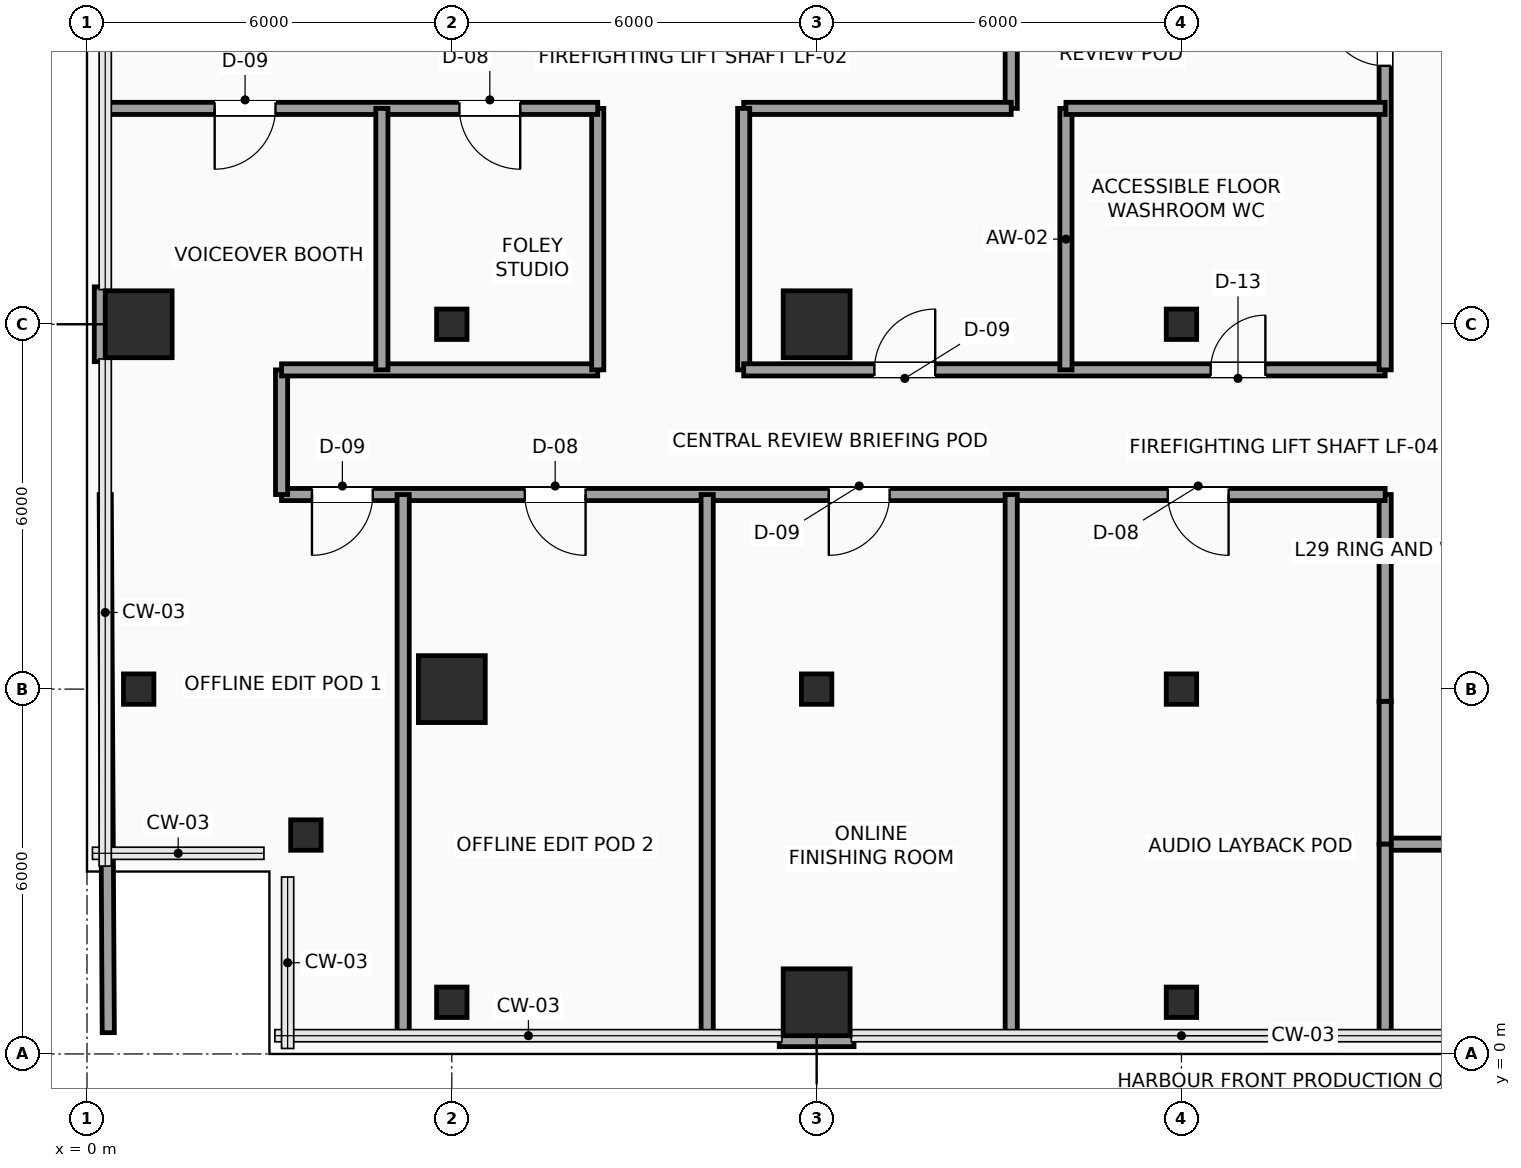
"""IFC4 building model, lengths in metres.
Left out: names, types, materials, properties, quantities, classifications, styles, units other than length and angle.
Written with IfcOpenShell. Run it as: python <this file> out.ifc"""

import sys

from ifc_helpers import new_model, si_unit, direction, frame, frame_2d, origin, origin_2d, place, context, subcontext, project, spatial, rectangle, hollow_rectangle, extrude, element, fill, save


model = new_model("IFC4")
c1 = context("Model", 3, precision=1e-05, world=origin(), true_north=direction((0.0, 1.0)))
c2 = subcontext(c1, "Body", "Model", "MODEL_VIEW")
j1 = project(units=[si_unit("LENGTHUNIT", "METRE"), si_unit("PLANEANGLEUNIT", "RADIAN")], contexts=[c1])
p1 = place(None, origin())
s1 = spatial("IfcSite", under=j1, at=p1, CompositionType="ELEMENT")
p2 = place(p1, origin())
s2 = spatial("IfcBuilding", under=s1, at=p2, CompositionType="ELEMENT")
p3 = place(p2, frame((0.0, 0.0, 123.15)))
s3 = spatial("IfcBuildingStorey", under=s2, at=p3, CompositionType="ELEMENT", Elevation=123.15)
for number, where, z_axis, x_axis in (
    (1, (3.6, 3.6, 0.0), (0.0, 0.0, 1.0), (1.0, 0.0, 0.0)),
    (2, (0.85, 6.0, 0.0), (0.0, 0.0, 1.0), (1.0, 0.0, 0.0)),
):
    element("IfcColumn", number, at=place(p3, frame(where, z_axis=z_axis, x_axis=x_axis)), inside=s3, PredefinedType="COLUMN", context=c2, shape_type="SweptSolid", body=[
        extrude(hollow_rectangle(XDim=0.5, YDim=0.5, WallThickness=0.025, InnerFilletRadius=0.025, OuterFilletRadius=0.04, at=origin_2d()), origin(), (0.0, 0.0, 1.0), 3.75),
    ])
p4 = place(p3, frame((0.85, 12.0, 0.0), z_axis=(0.0, 0.0, 1.0), x_axis=(1.0, 0.0, 0.0)))
e3 = element("IfcColumn", 3, at=p4, inside=s3, PredefinedType="COLUMN", context=c2, shape_type="SweptSolid", body=[
    extrude(rectangle(XDim=1.1, YDim=1.1, at=origin_2d()), origin(), (0.0, 0.0, 1.0), 3.75),
])
p5 = place(p3, frame((6.0, 0.85, 0.0), z_axis=(0.0, 0.0, 1.0), x_axis=(1.0, 0.0, 0.0)))
e4 = element("IfcColumn", 4, at=p5, inside=s3, PredefinedType="COLUMN", context=c2, shape_type="SweptSolid", body=[
    extrude(hollow_rectangle(XDim=0.5, YDim=0.5, WallThickness=0.025, InnerFilletRadius=0.025, OuterFilletRadius=0.04, at=origin_2d()), origin(), (0.0, 0.0, 1.0), 3.75),
])
p6 = place(p3, frame((6.0, 6.0, 0.0), z_axis=(0.0, 0.0, 1.0), x_axis=(1.0, 0.0, 0.0)))
e5 = element("IfcColumn", 5, at=p6, inside=s3, PredefinedType="COLUMN", context=c2, shape_type="SweptSolid", body=[
    extrude(rectangle(XDim=1.1, YDim=1.1, at=origin_2d()), origin(), (0.0, 0.0, 1.0), 3.75),
])
p7 = place(p3, frame((6.0, 12.0, 0.0), z_axis=(0.0, 0.0, 1.0), x_axis=(1.0, 0.0, 0.0)))
e6 = element("IfcColumn", 6, at=p7, inside=s3, PredefinedType="COLUMN", context=c2, shape_type="SweptSolid", body=[
    extrude(hollow_rectangle(XDim=0.5, YDim=0.5, WallThickness=0.025, InnerFilletRadius=0.025, OuterFilletRadius=0.04, at=origin_2d()), origin(), (0.0, 0.0, 1.0), 3.75),
])
p8 = place(p3, frame((12.0, 0.85, 0.0), z_axis=(0.0, 0.0, 1.0), x_axis=(1.0, 0.0, 0.0)))
e7 = element("IfcColumn", 7, at=p8, inside=s3, PredefinedType="COLUMN", context=c2, shape_type="SweptSolid", body=[
    extrude(rectangle(XDim=1.1, YDim=1.1, at=origin_2d()), origin(), (0.0, 0.0, 1.0), 3.75),
])
p9 = place(p3, frame((12.0, 6.0, 0.0), z_axis=(0.0, 0.0, 1.0), x_axis=(1.0, 0.0, 0.0)))
e8 = element("IfcColumn", 8, at=p9, inside=s3, PredefinedType="COLUMN", context=c2, shape_type="SweptSolid", body=[
    extrude(hollow_rectangle(XDim=0.5, YDim=0.5, WallThickness=0.025, InnerFilletRadius=0.025, OuterFilletRadius=0.04, at=origin_2d()), origin(), (0.0, 0.0, 1.0), 3.75),
])
p10 = place(p3, frame((12.0, 12.0, 0.0), z_axis=(0.0, 0.0, 1.0), x_axis=(1.0, 0.0, 0.0)))
e9 = element("IfcColumn", 9, at=p10, inside=s3, PredefinedType="COLUMN", context=c2, shape_type="SweptSolid", body=[
    extrude(rectangle(XDim=1.1, YDim=1.1, at=origin_2d()), origin(), (0.0, 0.0, 1.0), 3.75),
])
for number, where, z_axis, x_axis in (
    (10, (18.0, 0.85, 0.0), (0.0, 0.0, 1.0), (1.0, 0.0, 0.0)),
    (11, (18.0, 6.0, 0.0), (0.0, 0.0, 1.0), (1.0, 0.0, 0.0)),
    (12, (18.0, 12.0, 0.0), (0.0, 0.0, 1.0), (1.0, 0.0, 0.0)),
):
    element("IfcColumn", number, at=place(p3, frame(where, z_axis=z_axis, x_axis=x_axis)), inside=s3, PredefinedType="COLUMN", context=c2, shape_type="SweptSolid", body=[
        extrude(hollow_rectangle(XDim=0.5, YDim=0.5, WallThickness=0.025, InnerFilletRadius=0.025, OuterFilletRadius=0.04, at=origin_2d()), origin(), (0.0, 0.0, 1.0), 3.75),
    ])
for number, where, z_axis, x_axis in (
    (13, (0.24, 11.385, 0.0), (0.0, 0.0, 1.0), (0.0, 1.0, 0.0)),
    (14, (12.615, 0.24, 0.0), (0.0, 0.0, 1.0), (-1.0, 0.0, 0.0)),
):
    element("IfcWall", number, at=place(p3, frame(where, z_axis=z_axis, x_axis=x_axis)), inside=s3, PredefinedType="SOLIDWALL", context=c2, shape_type="SweptSolid", body=[
        extrude(rectangle(XDim=1.23, YDim=0.24, at=frame_2d((0.615, 0.0))), origin(), (0.0, 0.0, 1.0), 3.525),
    ])
p11 = place(p3, frame((23.95, 3.45, 0.0), z_axis=(0.0, 0.0, 1.0), x_axis=(-1.0, 0.0, 0.0)))
e15 = element("IfcWall", 15, at=p11, inside=s3, PredefinedType="SOLIDWALL", context=c2, shape_type="SweptSolid", body=[
    extrude(rectangle(XDim=2.6, YDim=0.2, at=frame_2d((1.3, 0.0))), origin(), (0.0, 0.0, 1.0), 3.067),
])
p12 = place(p3, frame((21.35, 3.45, 0.0), z_axis=(0.0, 0.0, 1.0), x_axis=(0.0, 1.0, 0.0)))
e16 = element("IfcWall", 16, at=p12, inside=s3, PredefinedType="SOLIDWALL", context=c2, shape_type="SweptSolid", body=[
    extrude(rectangle(XDim=2.35, YDim=0.2, at=frame_2d((1.175, 0.0))), origin(), (0.0, 0.0, 1.0), 3.525),
])
p13 = place(p3, frame((21.35, 5.8, 0.0), z_axis=(0.0, 0.0, 1.0), x_axis=(0.0, 1.0, 0.0)))
e17 = element("IfcWall", 17, at=p13, inside=s3, PredefinedType="SOLIDWALL", context=c2, shape_type="SweptSolid", body=[
    extrude(rectangle(XDim=3.4, YDim=0.2, at=frame_2d((1.7, 0.0))), origin(), (0.0, 0.0, 1.0), 3.525),
])
p14 = place(p3, frame((21.35, 9.2, 0.0), z_axis=(0.0, 0.0, 1.0), x_axis=(-1.0, 0.0, 0.0)))
e18 = element("IfcWall", 18, at=p14, inside=s3, PredefinedType="SOLIDWALL", context=c2, shape_type="SweptSolid", body=[
    extrude(rectangle(XDim=18.15, YDim=0.2, at=frame_2d((9.075, 0.0))), origin(), (0.0, 0.0, 1.0), 3.067),
])
p15 = place(p14, frame((16.65, 0.0, 0.0)))
e19 = element("IfcOpeningElement", 19, at=p15, cuts=e18, PredefinedType="OPENING", context=c2, shape_type="SweptSolid", body=[
    extrude(rectangle(XDim=1.0, YDim=2.2, at=frame_2d((0.5, 1.1))), frame((0.0, 0.11, 0.0), z_axis=(0.0, -1.0, 0.0), x_axis=(1.0, 0.0, 0.0)), (0.0, 0.0, 1.0), 0.22),
])
p16 = place(p14, frame((13.15, 0.0, 0.0)))
e20 = element("IfcOpeningElement", 20, at=p16, cuts=e18, PredefinedType="OPENING", context=c2, shape_type="SweptSolid", body=[
    extrude(rectangle(XDim=1.0, YDim=2.2, at=frame_2d((0.5, 1.1))), frame((0.0, 0.11, 0.0), z_axis=(0.0, -1.0, 0.0), x_axis=(1.0, 0.0, 0.0)), (0.0, 0.0, 1.0), 0.22),
])
p17 = place(p14, frame((8.15, 0.0, 0.0)))
e21 = element("IfcOpeningElement", 21, at=p17, cuts=e18, PredefinedType="OPENING", context=c2, shape_type="SweptSolid", body=[
    extrude(rectangle(XDim=1.0, YDim=2.2, at=frame_2d((0.5, 1.1))), frame((0.0, 0.11, 0.0), z_axis=(0.0, -1.0, 0.0), x_axis=(1.0, 0.0, 0.0)), (0.0, 0.0, 1.0), 0.22),
])
p18 = place(p14, frame((2.575, 0.0, 0.0)))
e22 = element("IfcOpeningElement", 22, at=p18, cuts=e18, PredefinedType="OPENING", context=c2, shape_type="SweptSolid", body=[
    extrude(rectangle(XDim=1.0, YDim=2.2, at=frame_2d((0.5, 1.1))), frame((0.0, 0.11, 0.0), z_axis=(0.0, -1.0, 0.0), x_axis=(1.0, 0.0, 0.0)), (0.0, 0.0, 1.0), 0.22),
])
p19 = place(p3, frame((3.2, 9.2, 0.0), z_axis=(0.0, 0.0, 1.0), x_axis=(0.0, 1.0, 0.0)))
e23 = element("IfcWall", 23, at=p19, inside=s3, PredefinedType="SOLIDWALL", context=c2, shape_type="SweptSolid", body=[
    extrude(rectangle(XDim=2.05, YDim=0.2, at=frame_2d((1.025, 0.0))), origin(), (0.0, 0.0, 1.0), 3.525),
])
p20 = place(p3, frame((3.2, 11.25, 0.0), z_axis=(0.0, 0.0, 1.0), x_axis=(1.0, 0.0, 0.0)))
e24 = element("IfcWall", 24, at=p20, inside=s3, PredefinedType="SOLIDWALL", context=c2, shape_type="SweptSolid", body=[
    extrude(rectangle(XDim=5.2, YDim=0.2, at=frame_2d((2.6, 0.0))), origin(), (0.0, 0.0, 1.0), 3.525),
])
p21 = place(p3, frame((8.4, 11.25, 0.0), z_axis=(0.0, 0.0, 1.0), x_axis=(0.0, 1.0, 0.0)))
e25 = element("IfcWall", 25, at=p21, inside=s3, PredefinedType="SOLIDWALL", context=c2, shape_type="SweptSolid", body=[
    extrude(rectangle(XDim=4.3, YDim=0.2, at=frame_2d((2.15, 0.0))), origin(), (0.0, 0.0, 1.0), 3.525),
])
p22 = place(p3, frame((8.4, 15.55, 0.0), z_axis=(0.0, 0.0, 1.0), x_axis=(-1.0, 0.0, 0.0)))
e26 = element("IfcWall", 26, at=p22, inside=s3, PredefinedType="SOLIDWALL", context=c2, shape_type="SweptSolid", body=[
    extrude(rectangle(XDim=8.1, YDim=0.2, at=frame_2d((4.05, 0.0))), origin(), (0.0, 0.0, 1.0), 3.525),
])
p23 = place(p22, frame((5.3, 0.0, 0.0)))
e27 = element("IfcOpeningElement", 27, at=p23, cuts=e26, PredefinedType="OPENING", context=c2, shape_type="SweptSolid", body=[
    extrude(rectangle(XDim=1.0, YDim=2.2, at=frame_2d((0.5, 1.1))), frame((0.0, 0.11, 0.0), z_axis=(0.0, -1.0, 0.0), x_axis=(1.0, 0.0, 0.0)), (0.0, 0.0, 1.0), 0.22),
])
p24 = place(p22, frame((1.275, 0.0, 0.0)))
e28 = element("IfcOpeningElement", 28, at=p24, cuts=e26, PredefinedType="OPENING", context=c2, shape_type="SweptSolid", body=[
    extrude(rectangle(XDim=1.0, YDim=2.2, at=frame_2d((0.5, 1.1))), frame((0.0, 0.11, 0.0), z_axis=(0.0, -1.0, 0.0), x_axis=(1.0, 0.0, 0.0)), (0.0, 0.0, 1.0), 0.22),
])
p25 = place(p3, frame((15.2, 17.95, 0.0), z_axis=(0.0, 0.0, 1.0), x_axis=(0.0, -1.0, 0.0)))
e29 = element("IfcWall", 29, at=p25, inside=s3, PredefinedType="SOLIDWALL", context=c2, shape_type="SweptSolid", body=[
    extrude(rectangle(XDim=2.4, YDim=0.2, at=frame_2d((1.2, 0.0))), origin(), (0.0, 0.0, 1.0), 3.525),
])
p26 = place(p3, frame((15.2, 15.55, 0.0), z_axis=(0.0, 0.0, 1.0), x_axis=(-1.0, 0.0, 0.0)))
e30 = element("IfcWall", 30, at=p26, inside=s3, PredefinedType="SOLIDWALL", context=c2, shape_type="SweptSolid", body=[
    extrude(rectangle(XDim=4.4, YDim=0.2, at=frame_2d((2.2, 0.0))), origin(), (0.0, 0.0, 1.0), 3.525),
])
p27 = place(p3, frame((10.8, 15.55, 0.0), z_axis=(0.0, 0.0, 1.0), x_axis=(0.0, -1.0, 0.0)))
e31 = element("IfcWall", 31, at=p27, inside=s3, PredefinedType="SOLIDWALL", context=c2, shape_type="SweptSolid", body=[
    extrude(rectangle(XDim=4.3, YDim=0.2, at=frame_2d((2.15, 0.0))), origin(), (0.0, 0.0, 1.0), 3.525),
])
p28 = place(p3, frame((10.8, 11.25, 0.0), z_axis=(0.0, 0.0, 1.0), x_axis=(1.0, 0.0, 0.0)))
e32 = element("IfcWall", 32, at=p28, inside=s3, PredefinedType="SOLIDWALL", context=c2, shape_type="SweptSolid", body=[
    extrude(rectangle(XDim=10.55, YDim=0.2, at=frame_2d((5.275, 0.0))), origin(), (0.0, 0.0, 1.0), 3.525),
])
p29 = place(p28, frame((2.15, 0.0, 0.0)))
e33 = element("IfcOpeningElement", 33, at=p29, cuts=e32, PredefinedType="OPENING", context=c2, shape_type="SweptSolid", body=[
    extrude(rectangle(XDim=1.0, YDim=2.2, at=frame_2d((0.5, 1.1))), frame((0.0, 0.11, 0.0), z_axis=(0.0, -1.0, 0.0), x_axis=(1.0, 0.0, 0.0)), (0.0, 0.0, 1.0), 0.22),
])
p30 = place(p28, frame((7.68, 0.0, 0.0)))
e34 = element("IfcOpeningElement", 34, at=p30, cuts=e32, PredefinedType="OPENING", context=c2, shape_type="SweptSolid", body=[
    extrude(rectangle(XDim=0.9, YDim=2.1, at=frame_2d((0.45, 1.05))), frame((0.0, 0.11, 0.0), z_axis=(0.0, -1.0, 0.0), x_axis=(1.0, 0.0, 0.0)), (0.0, 0.0, 1.0), 0.22),
])
p31 = place(p3, frame((21.35, 11.25, 0.0), z_axis=(0.0, 0.0, 1.0), x_axis=(0.0, 1.0, 0.0)))
e35 = element("IfcWall", 35, at=p31, inside=s3, PredefinedType="SOLIDWALL", context=c2, shape_type="SweptSolid", body=[
    extrude(rectangle(XDim=19.0, YDim=0.2, at=frame_2d((9.5, 0.0))), origin(), (0.0, 0.0, 1.0), 3.525),
])
p32 = place(p31, frame((8.7, 0.0, 0.0)))
e36 = element("IfcOpeningElement", 36, at=p32, cuts=e35, PredefinedType="OPENING", context=c2, shape_type="SweptSolid", body=[
    extrude(rectangle(XDim=0.95, YDim=2.15, at=frame_2d((0.475, 1.075))), frame((0.0, 0.11, 0.0), z_axis=(0.0, -1.0, 0.0), x_axis=(1.0, 0.0, 0.0)), (0.0, 0.0, 1.0), 0.22),
])
p33 = place(p31, frame((13.475, 0.0, 0.0)))
e37 = element("IfcOpeningElement", 37, at=p33, cuts=e35, PredefinedType="OPENING", context=c2, shape_type="SweptSolid", body=[
    extrude(rectangle(XDim=0.9, YDim=2.1, at=frame_2d((0.45, 1.05))), frame((0.0, 0.11, 0.0), z_axis=(0.0, -1.0, 0.0), x_axis=(1.0, 0.0, 0.0)), (0.0, 0.0, 1.0), 0.22),
])
p34 = place(p31, frame((5.0, 0.0, 0.0)))
e38 = element("IfcOpeningElement", 38, at=p34, cuts=e35, PredefinedType="OPENING", context=c2, shape_type="SweptSolid", body=[
    extrude(rectangle(XDim=1.0, YDim=2.2, at=frame_2d((0.5, 1.1))), frame((0.0, 0.11, 0.0), z_axis=(0.0, -1.0, 0.0), x_axis=(1.0, 0.0, 0.0)), (0.0, 0.0, 1.0), 0.22),
])
p35 = place(p3, frame((16.1, 11.25, 0.0), z_axis=(0.0, 0.0, 1.0), x_axis=(0.0, 1.0, 0.0)))
e39 = element("IfcWall", 39, at=p35, inside=s3, PredefinedType="PARTITIONING", context=c2, shape_type="SweptSolid", body=[
    extrude(rectangle(XDim=4.3, YDim=0.2, at=frame_2d((2.15, 0.0))), origin(), (0.0, 0.0, 1.0), 3.525),
])
p36 = place(p3, frame((16.1, 15.55, 0.0), z_axis=(0.0, 0.0, 1.0), x_axis=(1.0, 0.0, 0.0)))
e40 = element("IfcWall", 40, at=p36, inside=s3, PredefinedType="PARTITIONING", context=c2, shape_type="SweptSolid", body=[
    extrude(rectangle(XDim=5.25, YDim=0.2, at=frame_2d((2.625, 0.0))), origin(), (0.0, 0.0, 1.0), 3.525),
])
p37 = place(p3, frame((21.35, 0.3, 0.0), z_axis=(0.0, 0.0, 1.0), x_axis=(0.0, 1.0, 0.0)))
e41 = element("IfcWall", 41, at=p37, inside=s3, PredefinedType="PARTITIONING", context=c2, shape_type="SweptSolid", body=[
    extrude(rectangle(XDim=3.15, YDim=0.2, at=frame_2d((1.575, 0.0))), origin(), (0.0, 0.0, 1.0), 3.525),
])
p38 = place(p3, frame((0.35, 0.35, 0.0), z_axis=(0.0, 0.0, 1.0), x_axis=(-0.005655237989, 0.999984009014, 0.0)))
e42 = element("IfcWall", 42, at=p38, inside=s3, PredefinedType="PARTITIONING", context=c2, shape_type="SweptSolid", body=[
    extrude(rectangle(XDim=8.85, YDim=0.2, at=frame_2d((4.425, 0.0))), origin(), (0.0, 0.0, 1.0), 3.525),
])
for number, where, z_axis, x_axis in (
    (43, (5.2, 0.3, 0.0), (0.0, 0.0, 1.0), (0.0, 1.0, 0.0)),
    (44, (10.2, 0.3, 0.0), (0.0, 0.0, 1.0), (0.0, 1.0, 0.0)),
    (45, (15.2, 0.3, 0.0), (0.0, 0.0, 1.0), (0.0, 1.0, 0.0)),
):
    element("IfcWall", number, at=place(p3, frame(where, z_axis=z_axis, x_axis=x_axis)), inside=s3, PredefinedType="PARTITIONING", context=c2, shape_type="SweptSolid", body=[
        extrude(rectangle(XDim=8.9, YDim=0.2, at=frame_2d((4.45, 0.0))), origin(), (0.0, 0.0, 1.0), 3.525),
    ])
p39 = place(p3, frame((4.85, 11.25, 0.0), z_axis=(0.0, 0.0, 1.0), x_axis=(0.0, 1.0, 0.0)))
e46 = element("IfcWall", 46, at=p39, inside=s3, PredefinedType="PARTITIONING", context=c2, shape_type="SweptSolid", body=[
    extrude(rectangle(XDim=4.3, YDim=0.2, at=frame_2d((2.15, 0.0))), origin(), (0.0, 0.0, 1.0), 3.525),
])
p40 = place(p15, origin())
e47 = element("IfcDoor", 47, at=p40, inside=s3, OperationType="SINGLE_SWING_RIGHT", PredefinedType="DOOR", context=c2, shape_type="SweptSolid", body=[
    extrude(rectangle(XDim=1.0, YDim=2.2, at=frame_2d((0.5, 1.1))), frame((0.0, 0.025, 0.0), z_axis=(0.0, -1.0, 0.0), x_axis=(1.0, 0.0, 0.0)), (0.0, 0.0, 1.0), 0.05),
])
fill(e19, e47)
p41 = place(p16, origin())
e48 = element("IfcDoor", 48, at=p41, inside=s3, OperationType="SINGLE_SWING_LEFT", PredefinedType="DOOR", context=c2, shape_type="SweptSolid", body=[
    extrude(rectangle(XDim=1.0, YDim=2.2, at=frame_2d((0.5, 1.1))), frame((0.0, 0.025, 0.0), z_axis=(0.0, -1.0, 0.0), x_axis=(1.0, 0.0, 0.0)), (0.0, 0.0, 1.0), 0.05),
])
fill(e20, e48)
p42 = place(p17, origin())
e49 = element("IfcDoor", 49, at=p42, inside=s3, OperationType="SINGLE_SWING_RIGHT", PredefinedType="DOOR", context=c2, shape_type="SweptSolid", body=[
    extrude(rectangle(XDim=1.0, YDim=2.2, at=frame_2d((0.5, 1.1))), frame((0.0, 0.025, 0.0), z_axis=(0.0, -1.0, 0.0), x_axis=(1.0, 0.0, 0.0)), (0.0, 0.0, 1.0), 0.05),
])
fill(e21, e49)
p43 = place(p18, origin())
e50 = element("IfcDoor", 50, at=p43, inside=s3, OperationType="SINGLE_SWING_LEFT", PredefinedType="DOOR", context=c2, shape_type="SweptSolid", body=[
    extrude(rectangle(XDim=1.0, YDim=2.2, at=frame_2d((0.5, 1.1))), frame((0.0, 0.025, 0.0), z_axis=(0.0, -1.0, 0.0), x_axis=(1.0, 0.0, 0.0)), (0.0, 0.0, 1.0), 0.05),
])
fill(e22, e50)
p44 = place(p23, origin())
e51 = element("IfcDoor", 51, at=p44, inside=s3, OperationType="SINGLE_SWING_RIGHT", PredefinedType="DOOR", context=c2, shape_type="SweptSolid", body=[
    extrude(rectangle(XDim=1.0, YDim=2.2, at=frame_2d((0.5, 1.1))), frame((0.0, 0.025, 0.0), z_axis=(0.0, -1.0, 0.0), x_axis=(1.0, 0.0, 0.0)), (0.0, 0.0, 1.0), 0.05),
])
fill(e27, e51)
p45 = place(p24, origin())
e52 = element("IfcDoor", 52, at=p45, inside=s3, OperationType="SINGLE_SWING_LEFT", PredefinedType="DOOR", context=c2, shape_type="SweptSolid", body=[
    extrude(rectangle(XDim=1.0, YDim=2.2, at=frame_2d((0.5, 1.1))), frame((0.0, 0.025, 0.0), z_axis=(0.0, -1.0, 0.0), x_axis=(1.0, 0.0, 0.0)), (0.0, 0.0, 1.0), 0.05),
])
fill(e28, e52)
p46 = place(p29, origin())
e53 = element("IfcDoor", 53, at=p46, inside=s3, OperationType="SINGLE_SWING_RIGHT", PredefinedType="DOOR", context=c2, shape_type="SweptSolid", body=[
    extrude(rectangle(XDim=1.0, YDim=2.2, at=frame_2d((0.5, 1.1))), frame((0.0, 0.025, 0.0), z_axis=(0.0, -1.0, 0.0), x_axis=(1.0, 0.0, 0.0)), (0.0, 0.0, 1.0), 0.05),
])
fill(e33, e53)
p47 = place(p30, origin())
e54 = element("IfcDoor", 54, at=p47, inside=s3, OperationType="SINGLE_SWING_RIGHT", PredefinedType="DOOR", context=c2, shape_type="SweptSolid", body=[
    extrude(rectangle(XDim=0.9, YDim=2.1, at=frame_2d((0.45, 1.05))), frame((0.0, 0.025, 0.0), z_axis=(0.0, -1.0, 0.0), x_axis=(1.0, 0.0, 0.0)), (0.0, 0.0, 1.0), 0.05),
])
fill(e34, e54)
p48 = place(p34, origin())
e55 = element("IfcDoor", 55, at=p48, inside=s3, OperationType="SINGLE_SWING_RIGHT", PredefinedType="DOOR", context=c2, shape_type="SweptSolid", body=[
    extrude(rectangle(XDim=1.0, YDim=2.2, at=frame_2d((0.5, 1.1))), frame((0.0, 0.025, 0.0), z_axis=(0.0, -1.0, 0.0), x_axis=(1.0, 0.0, 0.0)), (0.0, 0.0, 1.0), 0.05),
])
fill(e38, e55)
save(model, sys.argv[1])
